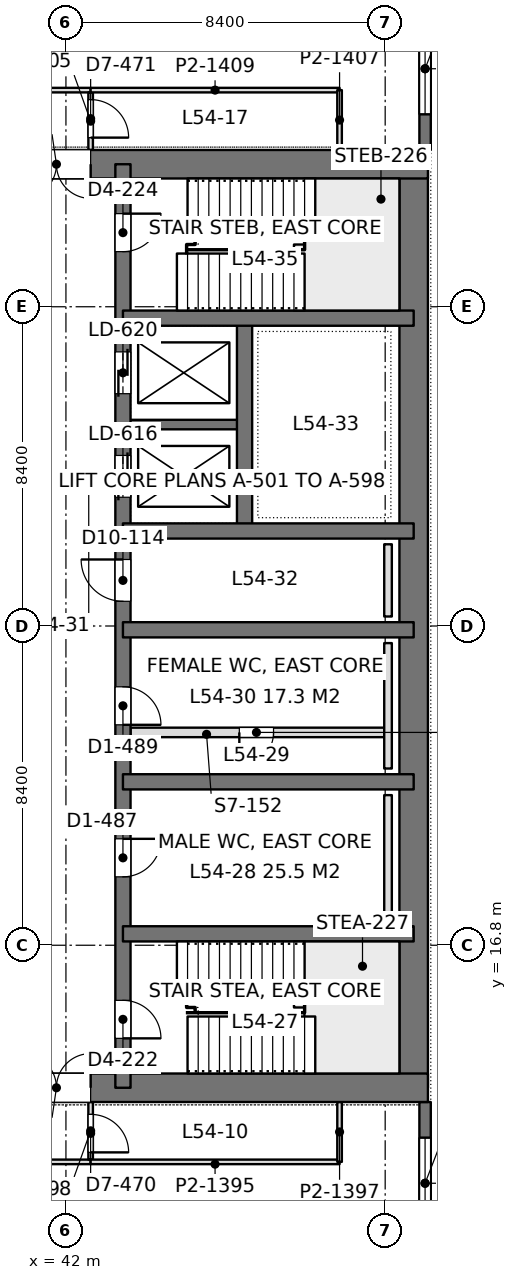
"""IFC4 building model, lengths in metres.
Left out: names, types, materials, properties, quantities, classifications, styles, units other than length and angle.
Written with IfcOpenShell. Run it as: python <this file> out.ifc"""

import sys

from ifc_helpers import new_model, si_unit, direction, frame, frame_2d, origin, place, context, subcontext, project, spatial, rectangle, extrude, element, fill, save


model = new_model("IFC4")
c1 = context("Model", 3, precision=1e-05, world=origin(), true_north=direction((0.0, 1.0)))
c2 = subcontext(c1, "Body", "Model", "MODEL_VIEW")
j1 = project(units=[si_unit("LENGTHUNIT", "METRE"), si_unit("PLANEANGLEUNIT", "RADIAN")], contexts=[c1])
p1 = place(None, origin())
s1 = spatial("IfcSite", under=j1, at=p1, CompositionType="ELEMENT")
p2 = place(p1, origin())
s2 = spatial("IfcBuilding", under=s1, at=p2, CompositionType="ELEMENT")
p3 = place(p2, frame((0.0, 0.0, 236.4)))
s3 = spatial("IfcBuildingStorey", under=s2, at=p3, CompositionType="ELEMENT", Elevation=236.4)
p4 = place(p3, frame((33.675, 13.05, 0.0), z_axis=(0.0, 0.0, 1.0), x_axis=(1.0, 0.0, 0.0)))
e1 = element("IfcWall", 1, at=p4, inside=s3, PredefinedType="SHEAR", context=c2, shape_type="SweptSolid", body=[
    extrude(rectangle(XDim=17.85, YDim=0.75, at=frame_2d((8.925, 0.0))), origin(), (0.0, 0.0, 1.0), 4.2),
])
p5 = place(p4, frame((7.175, 0.0, 0.0)))
e2 = element("IfcOpeningElement", 2, at=p5, cuts=e1, PredefinedType="OPENING", context=c2, shape_type="SweptSolid", body=[
    extrude(rectangle(XDim=1.8, YDim=2.4, at=frame_2d((0.9, 1.2))), frame((0.0, 0.385, 0.0), z_axis=(0.0, -1.0, 0.0), x_axis=(1.0, 0.0, 0.0)), (0.0, 0.0, 1.0), 0.77),
])
p6 = place(p3, frame((33.675, 37.35, 0.0), z_axis=(0.0, 0.0, 1.0), x_axis=(1.0, 0.0, 0.0)))
e3 = element("IfcWall", 3, at=p6, inside=s3, PredefinedType="SHEAR", context=c2, shape_type="SweptSolid", body=[
    extrude(rectangle(XDim=17.85, YDim=0.75, at=frame_2d((8.925, 0.0))), origin(), (0.0, 0.0, 1.0), 4.2),
])
p7 = place(p6, frame((7.175, 0.0, 0.0)))
e4 = element("IfcOpeningElement", 4, at=p7, cuts=e3, PredefinedType="OPENING", context=c2, shape_type="SweptSolid", body=[
    extrude(rectangle(XDim=1.8, YDim=2.4, at=frame_2d((0.9, 1.2))), frame((0.0, 0.385, 0.0), z_axis=(0.0, -1.0, 0.0), x_axis=(1.0, 0.0, 0.0)), (0.0, 0.0, 1.0), 0.77),
])
p8 = place(p3, frame((51.15, 13.05, 0.0), z_axis=(0.0, 0.0, 1.0), x_axis=(0.0, 1.0, 0.0)))
e5 = element("IfcWall", 5, at=p8, inside=s3, PredefinedType="SHEAR", context=c2, shape_type="SweptSolid", body=[
    extrude(rectangle(XDim=24.3, YDim=0.75, at=frame_2d((12.15, 0.0))), origin(), (0.0, 0.0, 1.0), 4.2),
])
p9 = place(p3, frame((43.5, 13.05, 0.0), z_axis=(0.0, 0.0, 1.0), x_axis=(0.0, 1.0, 0.0)))
e6 = element("IfcWall", 6, at=p9, inside=s3, PredefinedType="SHEAR", context=c2, shape_type="SweptSolid", body=[
    extrude(rectangle(XDim=24.3, YDim=0.4, at=frame_2d((12.15, 0.0))), origin(), (0.0, 0.0, 1.0), 4.2),
])
p10 = place(p9, frame((1.3, 0.0, 0.0)))
e7 = element("IfcOpeningElement", 7, at=p10, cuts=e6, PredefinedType="OPENING", context=c2, shape_type="SweptSolid", body=[
    extrude(rectangle(XDim=1.0, YDim=2.2, at=frame_2d((0.5, 1.1))), frame((0.0, 0.21, 0.0), z_axis=(0.0, -1.0, 0.0), x_axis=(1.0, 0.0, 0.0)), (0.0, 0.0, 1.0), 0.42),
])
p11 = place(p9, frame((22.0, 0.0, 0.0)))
e8 = element("IfcOpeningElement", 8, at=p11, cuts=e6, PredefinedType="OPENING", context=c2, shape_type="SweptSolid", body=[
    extrude(rectangle(XDim=1.0, YDim=2.2, at=frame_2d((0.5, 1.1))), frame((0.0, 0.21, 0.0), z_axis=(0.0, -1.0, 0.0), x_axis=(1.0, 0.0, 0.0)), (0.0, 0.0, 1.0), 0.42),
])
p12 = place(p9, frame((5.55, 0.0, 0.0)))
e9 = element("IfcOpeningElement", 9, at=p12, cuts=e6, PredefinedType="OPENING", context=c2, shape_type="SweptSolid", body=[
    extrude(rectangle(XDim=1.0, YDim=2.2, at=frame_2d((0.5, 1.1))), frame((0.0, 0.21, 0.0), z_axis=(0.0, -1.0, 0.0), x_axis=(1.0, 0.0, 0.0)), (0.0, 0.0, 1.0), 0.42),
])
p13 = place(p9, frame((9.55, 0.0, 0.0)))
e10 = element("IfcOpeningElement", 10, at=p13, cuts=e6, PredefinedType="OPENING", context=c2, shape_type="SweptSolid", body=[
    extrude(rectangle(XDim=1.0, YDim=2.2, at=frame_2d((0.5, 1.1))), frame((0.0, 0.21, 0.0), z_axis=(0.0, -1.0, 0.0), x_axis=(1.0, 0.0, 0.0)), (0.0, 0.0, 1.0), 0.42),
])
p14 = place(p9, frame((12.8, 0.0, 0.0)))
e11 = element("IfcOpeningElement", 11, at=p14, cuts=e6, PredefinedType="OPENING", context=c2, shape_type="SweptSolid", body=[
    extrude(rectangle(XDim=1.1, YDim=2.2, at=frame_2d((0.55, 1.1))), frame((0.0, 0.21, 0.0), z_axis=(0.0, -1.0, 0.0), x_axis=(1.0, 0.0, 0.0)), (0.0, 0.0, 1.0), 0.42),
])
p15 = place(p9, frame((15.538, 0.0, 0.0)))
e12 = element("IfcOpeningElement", 12, at=p15, cuts=e6, PredefinedType="OPENING", context=c2, shape_type="SweptSolid", body=[
    extrude(rectangle(XDim=1.1, YDim=2.2, at=frame_2d((0.55, 1.1))), frame((0.0, 0.21, 0.0), z_axis=(0.0, -1.0, 0.0), x_axis=(1.0, 0.0, 0.0)), (0.0, 0.0, 1.0), 0.42),
])
p16 = place(p9, frame((18.262, 0.0, 0.0)))
e13 = element("IfcOpeningElement", 13, at=p16, cuts=e6, PredefinedType="OPENING", context=c2, shape_type="SweptSolid", body=[
    extrude(rectangle(XDim=1.1, YDim=2.2, at=frame_2d((0.55, 1.1))), frame((0.0, 0.21, 0.0), z_axis=(0.0, -1.0, 0.0), x_axis=(1.0, 0.0, 0.0)), (0.0, 0.0, 1.0), 0.42),
])
for number, where, z_axis, x_axis in (
    (14, (51.15, 17.1, 0.0), (0.0, 0.0, 1.0), (-1.0, 0.0, 0.0)),
    (15, (51.15, 21.1, 0.0), (0.0, 0.0, 1.0), (-1.0, 0.0, 0.0)),
    (16, (51.15, 25.1, 0.0), (0.0, 0.0, 1.0), (-1.0, 0.0, 0.0)),
    (17, (51.15, 27.7, 0.0), (0.0, 0.0, 1.0), (-1.0, 0.0, 0.0)),
    (18, (51.15, 33.3, 0.0), (0.0, 0.0, 1.0), (-1.0, 0.0, 0.0)),
):
    element("IfcWall", number, at=place(p3, frame(where, z_axis=z_axis, x_axis=x_axis)), inside=s3, PredefinedType="SHEAR", context=c2, shape_type="SweptSolid", body=[
        extrude(rectangle(XDim=7.65, YDim=0.4, at=frame_2d((3.825, 0.0))), origin(), (0.0, 0.0, 1.0), 4.2),
    ])
p17 = place(p3, frame((46.7, 27.7, 0.0), z_axis=(0.0, 0.0, 1.0), x_axis=(0.0, 1.0, 0.0)))
e19 = element("IfcWall", 19, at=p17, inside=s3, PredefinedType="SHEAR", context=c2, shape_type="SweptSolid", body=[
    extrude(rectangle(XDim=5.6, YDim=0.4, at=frame_2d((2.8, 0.0))), origin(), (0.0, 0.0, 1.0), 4.2),
])
p18 = place(p3, frame((46.7, 30.5, 0.0), z_axis=(0.0, 0.0, 1.0), x_axis=(-1.0, 0.0, 0.0)))
e20 = element("IfcWall", 20, at=p18, inside=s3, PredefinedType="SHEAR", context=c2, shape_type="SweptSolid", body=[
    extrude(rectangle(XDim=3.2, YDim=0.25, at=frame_2d((1.6, 0.0))), origin(), (0.0, 0.0, 1.0), 4.2),
])
p19 = place(p3, frame((51.45, 42.0, 0.0), z_axis=(0.0, 0.0, 1.0), x_axis=(0.0, -1.0, 0.0)))
e21 = element("IfcWall", 21, at=p19, inside=s3, PredefinedType="SOLIDWALL", context=c2, shape_type="SweptSolid", body=[
    extrude(rectangle(XDim=4.275, YDim=0.3, at=frame_2d((2.137, 0.0))), origin(), (0.0, 0.0, 1.0), 4.05),
])
p20 = place(p19, frame((0.938, 0.0, 0.9)))
e22 = element("IfcOpeningElement", 22, at=p20, cuts=e21, PredefinedType="OPENING", context=c2, shape_type="SweptSolid", body=[
    extrude(rectangle(XDim=2.4, YDim=1.9, at=frame_2d((1.2, 0.95))), frame((0.0, 0.16, 0.0), z_axis=(0.0, -1.0, 0.0), x_axis=(1.0, 0.0, 0.0)), (0.0, 0.0, 1.0), 0.32),
])
p21 = place(p3, frame((51.45, 12.675, 0.0), z_axis=(0.0, 0.0, 1.0), x_axis=(0.0, -1.0, 0.0)))
e23 = element("IfcWall", 23, at=p21, inside=s3, PredefinedType="SOLIDWALL", context=c2, shape_type="SweptSolid", body=[
    extrude(rectangle(XDim=4.275, YDim=0.3, at=frame_2d((2.138, 0.0))), origin(), (0.0, 0.0, 1.0), 4.05),
])
p22 = place(p21, frame((0.938, 0.0, 0.9)))
e24 = element("IfcOpeningElement", 24, at=p22, cuts=e23, PredefinedType="OPENING", context=c2, shape_type="SweptSolid", body=[
    extrude(rectangle(XDim=2.4, YDim=1.9, at=frame_2d((1.2, 0.95))), frame((0.0, 0.16, 0.0), z_axis=(0.0, -1.0, 0.0), x_axis=(1.0, 0.0, 0.0)), (0.0, 0.0, 1.0), 0.32),
])
p23 = place(p3, frame((1.2, 11.1, 0.0), z_axis=(0.0, 0.0, 1.0), x_axis=(1.0, 0.0, 0.0)))
e25 = element("IfcWall", 25, at=p23, inside=s3, PredefinedType="PARTITIONING", context=c2, shape_type="SweptSolid", body=[
    extrude(rectangle(XDim=41.452, YDim=0.12, at=frame_2d((20.726, 0.0))), origin(), (0.0, 0.0, 1.0), 3.55),
])
p24 = place(p23, frame((4.3, 0.0, 0.0)))
e26 = element("IfcOpeningElement", 26, at=p24, cuts=e25, PredefinedType="OPENING", context=c2, shape_type="SweptSolid", body=[
    extrude(rectangle(XDim=1.8, YDim=2.2, at=frame_2d((0.9, 1.1))), frame((0.0, 0.07, 0.0), z_axis=(0.0, -1.0, 0.0), x_axis=(1.0, 0.0, 0.0)), (0.0, 0.0, 1.0), 0.14),
])
p25 = place(p23, frame((9.5, 0.0, 0.0)))
e27 = element("IfcOpeningElement", 27, at=p25, cuts=e25, PredefinedType="OPENING", context=c2, shape_type="SweptSolid", body=[
    extrude(rectangle(XDim=1.8, YDim=2.2, at=frame_2d((0.9, 1.1))), frame((0.0, 0.07, 0.0), z_axis=(0.0, -1.0, 0.0), x_axis=(1.0, 0.0, 0.0)), (0.0, 0.0, 1.0), 0.14),
])
p26 = place(p23, frame((23.317, 0.0, 0.0)))
e28 = element("IfcOpeningElement", 28, at=p26, cuts=e25, PredefinedType="OPENING", context=c2, shape_type="SweptSolid", body=[
    extrude(rectangle(XDim=1.8, YDim=2.2, at=frame_2d((0.9, 1.1))), frame((0.0, 0.07, 0.0), z_axis=(0.0, -1.0, 0.0), x_axis=(1.0, 0.0, 0.0)), (0.0, 0.0, 1.0), 0.14),
])
p27 = place(p23, frame((31.933, 0.0, 0.0)))
e29 = element("IfcOpeningElement", 29, at=p27, cuts=e25, PredefinedType="OPENING", context=c2, shape_type="SweptSolid", body=[
    extrude(rectangle(XDim=1.8, YDim=2.2, at=frame_2d((0.9, 1.1))), frame((0.0, 0.07, 0.0), z_axis=(0.0, -1.0, 0.0), x_axis=(1.0, 0.0, 0.0)), (0.0, 0.0, 1.0), 0.14),
])
p28 = place(p3, frame((42.65, 11.158, 0.0), z_axis=(0.0, 0.0, 1.0), x_axis=(0.0, 1.0, 0.0)))
e30 = element("IfcWall", 30, at=p28, inside=s3, PredefinedType="PARTITIONING", context=c2, shape_type="SweptSolid", body=[
    extrude(rectangle(XDim=1.518, YDim=0.12, at=frame_2d((0.759, 0.0))), origin(), (0.0, 0.0, 1.0), 4.05),
])
p29 = place(p28, frame((0.192, 0.0, 0.0)))
e31 = element("IfcOpeningElement", 31, at=p29, cuts=e30, PredefinedType="OPENING", context=c2, shape_type="SweptSolid", body=[
    extrude(rectangle(XDim=1.0, YDim=2.4, at=frame_2d((0.5, 1.2))), frame((0.0, 0.07, 0.0), z_axis=(0.0, -1.0, 0.0), x_axis=(1.0, 0.0, 0.0)), (0.0, 0.0, 1.0), 0.14),
])
p30 = place(p3, frame((42.648, 11.1, 0.0), z_axis=(0.0, 0.0, 1.0), x_axis=(1.0, 0.0, 0.0)))
e32 = element("IfcWall", 32, at=p30, inside=s3, PredefinedType="PARTITIONING", context=c2, shape_type="SweptSolid", body=[
    extrude(rectangle(XDim=6.552, YDim=0.12, at=frame_2d((3.276, 0.0))), origin(), (0.0, 0.0, 1.0), 4.05),
])
p31 = place(p3, frame((49.2, 11.1, 0.0), z_axis=(0.0, 0.0, 1.0), x_axis=(0.0, 1.0, 0.0)))
e33 = element("IfcWall", 33, at=p31, inside=s3, PredefinedType="PARTITIONING", context=c2, shape_type="SweptSolid", body=[
    extrude(rectangle(XDim=1.576, YDim=0.12, at=frame_2d((0.788, 0.0))), origin(), (0.0, 0.0, 1.0), 4.05),
])
p32 = place(p3, frame((1.2, 39.3, 0.0), z_axis=(0.0, 0.0, 1.0), x_axis=(1.0, 0.0, 0.0)))
e34 = element("IfcWall", 34, at=p32, inside=s3, PredefinedType="PARTITIONING", context=c2, shape_type="SweptSolid", body=[
    extrude(rectangle(XDim=41.452, YDim=0.12, at=frame_2d((20.726, 0.0))), origin(), (0.0, 0.0, 1.0), 3.55),
])
p33 = place(p32, frame((4.3, 0.0, 0.0)))
e35 = element("IfcOpeningElement", 35, at=p33, cuts=e34, PredefinedType="OPENING", context=c2, shape_type="SweptSolid", body=[
    extrude(rectangle(XDim=1.8, YDim=2.2, at=frame_2d((0.9, 1.1))), frame((0.0, 0.07, 0.0), z_axis=(0.0, -1.0, 0.0), x_axis=(1.0, 0.0, 0.0)), (0.0, 0.0, 1.0), 0.14),
])
p34 = place(p32, frame((9.5, 0.0, 0.0)))
e36 = element("IfcOpeningElement", 36, at=p34, cuts=e34, PredefinedType="OPENING", context=c2, shape_type="SweptSolid", body=[
    extrude(rectangle(XDim=1.8, YDim=2.2, at=frame_2d((0.9, 1.1))), frame((0.0, 0.07, 0.0), z_axis=(0.0, -1.0, 0.0), x_axis=(1.0, 0.0, 0.0)), (0.0, 0.0, 1.0), 0.14),
])
p35 = place(p32, frame((23.317, 0.0, 0.0)))
e37 = element("IfcOpeningElement", 37, at=p35, cuts=e34, PredefinedType="OPENING", context=c2, shape_type="SweptSolid", body=[
    extrude(rectangle(XDim=1.8, YDim=2.2, at=frame_2d((0.9, 1.1))), frame((0.0, 0.07, 0.0), z_axis=(0.0, -1.0, 0.0), x_axis=(1.0, 0.0, 0.0)), (0.0, 0.0, 1.0), 0.14),
])
p36 = place(p32, frame((31.933, 0.0, 0.0)))
e38 = element("IfcOpeningElement", 38, at=p36, cuts=e34, PredefinedType="OPENING", context=c2, shape_type="SweptSolid", body=[
    extrude(rectangle(XDim=1.8, YDim=2.2, at=frame_2d((0.9, 1.1))), frame((0.0, 0.07, 0.0), z_axis=(0.0, -1.0, 0.0), x_axis=(1.0, 0.0, 0.0)), (0.0, 0.0, 1.0), 0.14),
])
p37 = place(p3, frame((42.65, 37.724, 0.0), z_axis=(0.0, 0.0, 1.0), x_axis=(0.0, 1.0, 0.0)))
e39 = element("IfcWall", 39, at=p37, inside=s3, PredefinedType="PARTITIONING", context=c2, shape_type="SweptSolid", body=[
    extrude(rectangle(XDim=1.518, YDim=0.12, at=frame_2d((0.759, 0.0))), origin(), (0.0, 0.0, 1.0), 4.05),
])
p38 = place(p37, frame((0.326, 0.0, 0.0)))
e40 = element("IfcOpeningElement", 40, at=p38, cuts=e39, PredefinedType="OPENING", context=c2, shape_type="SweptSolid", body=[
    extrude(rectangle(XDim=1.0, YDim=2.4, at=frame_2d((0.5, 1.2))), frame((0.0, 0.07, 0.0), z_axis=(0.0, -1.0, 0.0), x_axis=(1.0, 0.0, 0.0)), (0.0, 0.0, 1.0), 0.14),
])
p39 = place(p3, frame((42.648, 39.3, 0.0), z_axis=(0.0, 0.0, 1.0), x_axis=(1.0, 0.0, 0.0)))
e41 = element("IfcWall", 41, at=p39, inside=s3, PredefinedType="PARTITIONING", context=c2, shape_type="SweptSolid", body=[
    extrude(rectangle(XDim=6.552, YDim=0.12, at=frame_2d((3.276, 0.0))), origin(), (0.0, 0.0, 1.0), 3.69),
])
p40 = place(p3, frame((49.2, 37.724, 0.0), z_axis=(0.0, 0.0, 1.0), x_axis=(0.0, 1.0, 0.0)))
e42 = element("IfcWall", 42, at=p40, inside=s3, PredefinedType="PARTITIONING", context=c2, shape_type="SweptSolid", body=[
    extrude(rectangle(XDim=1.576, YDim=0.12, at=frame_2d((0.788, 0.0))), origin(), (0.0, 0.0, 1.0), 4.05),
])
p41 = place(p3, frame((43.7, 22.4, 0.0), z_axis=(0.0, 0.0, 1.0), x_axis=(1.0, 0.0, 0.0)))
e43 = element("IfcWall", 43, at=p41, inside=s3, PredefinedType="PARTITIONING", context=c2, shape_type="SweptSolid", body=[
    extrude(rectangle(XDim=6.675, YDim=0.25, at=frame_2d((3.337, 0.0))), origin(), (0.0, 0.0, 1.0), 4.0),
])
p42 = place(p41, frame((2.863, 0.0, 0.0)))
e44 = element("IfcOpeningElement", 44, at=p42, cuts=e43, PredefinedType="OPENING", context=c2, shape_type="SweptSolid", body=[
    extrude(rectangle(XDim=0.9, YDim=2.2, at=frame_2d((0.45, 1.1))), frame((0.0, 0.135, 0.0), z_axis=(0.0, -1.0, 0.0), x_axis=(1.0, 0.0, 0.0)), (0.0, 0.0, 1.0), 0.27),
])
for number, where, z_axis, x_axis in (
    (45, (50.475, 17.45, 0.0), (0.0, 0.0, 1.0), (0.0, 1.0, 0.0)),
    (46, (50.475, 21.45, 0.0), (0.0, 0.0, 1.0), (0.0, 1.0, 0.0)),
):
    element("IfcWall", number, at=place(p3, frame(where, z_axis=z_axis, x_axis=x_axis)), inside=s3, PredefinedType="PLUMBINGWALL", context=c2, shape_type="SweptSolid", body=[
        extrude(rectangle(XDim=3.3, YDim=0.2, at=frame_2d((1.65, 0.0))), origin(), (0.0, 0.0, 1.0), 1.2),
    ])
p43 = place(p3, frame((50.475, 25.45, 0.0), z_axis=(0.0, 0.0, 1.0), x_axis=(0.0, 1.0, 0.0)))
e47 = element("IfcWall", 47, at=p43, inside=s3, PredefinedType="PLUMBINGWALL", context=c2, shape_type="SweptSolid", body=[
    extrude(rectangle(XDim=1.9, YDim=0.2, at=frame_2d((0.95, 0.0))), origin(), (0.0, 0.0, 1.0), 1.2),
])
p44 = place(p20, origin())
e48 = element("IfcWindow", 48, at=p44, inside=s3, PartitioningType="SINGLE_PANEL", PredefinedType="WINDOW", context=c2, shape_type="SweptSolid", body=[
    extrude(rectangle(XDim=2.4, YDim=1.9, at=frame_2d((1.2, 0.95))), frame((0.0, 0.03, 0.0), z_axis=(0.0, -1.0, 0.0), x_axis=(1.0, 0.0, 0.0)), (0.0, 0.0, 1.0), 0.06),
])
fill(e22, e48)
p45 = place(p22, origin())
e49 = element("IfcWindow", 49, at=p45, inside=s3, PartitioningType="SINGLE_PANEL", PredefinedType="WINDOW", context=c2, shape_type="SweptSolid", body=[
    extrude(rectangle(XDim=2.4, YDim=1.9, at=frame_2d((1.2, 0.95))), frame((0.0, 0.03, 0.0), z_axis=(0.0, -1.0, 0.0), x_axis=(1.0, 0.0, 0.0)), (0.0, 0.0, 1.0), 0.06),
])
fill(e24, e49)
p46 = place(p5, origin())
e50 = element("IfcDoor", 50, at=p46, inside=s3, OperationType="DOUBLE_DOOR_SINGLE_SWING", PredefinedType="DOOR", context=c2, shape_type="SweptSolid", body=[
    extrude(rectangle(XDim=1.8, YDim=2.4, at=frame_2d((0.9, 1.2))), frame((0.0, 0.025, 0.0), z_axis=(0.0, -1.0, 0.0), x_axis=(1.0, 0.0, 0.0)), (0.0, 0.0, 1.0), 0.05),
])
fill(e2, e50)
p47 = place(p7, frame((1.8, 0.0, 0.0), z_axis=(0.0, 0.0, 1.0), x_axis=(-1.0, 0.0, 0.0)))
e51 = element("IfcDoor", 51, at=p47, inside=s3, OperationType="DOUBLE_DOOR_SINGLE_SWING", PredefinedType="DOOR", context=c2, shape_type="SweptSolid", body=[
    extrude(rectangle(XDim=1.8, YDim=2.4, at=frame_2d((0.9, 1.2))), frame((0.0, 0.025, 0.0), z_axis=(0.0, -1.0, 0.0), x_axis=(1.0, 0.0, 0.0)), (0.0, 0.0, 1.0), 0.05),
])
fill(e4, e51)
p48 = place(p10, frame((1.0, 0.0, 0.0), z_axis=(0.0, 0.0, 1.0), x_axis=(-1.0, 0.0, 0.0)))
e52 = element("IfcDoor", 52, at=p48, inside=s3, OperationType="SINGLE_SWING_RIGHT", PredefinedType="DOOR", context=c2, shape_type="SweptSolid", body=[
    extrude(rectangle(XDim=1.0, YDim=2.2, at=frame_2d((0.5, 1.1))), frame((0.0, 0.025, 0.0), z_axis=(0.0, -1.0, 0.0), x_axis=(1.0, 0.0, 0.0)), (0.0, 0.0, 1.0), 0.05),
])
fill(e7, e52)
p49 = place(p11, frame((1.0, 0.0, 0.0), z_axis=(0.0, 0.0, 1.0), x_axis=(-1.0, 0.0, 0.0)))
e53 = element("IfcDoor", 53, at=p49, inside=s3, OperationType="SINGLE_SWING_LEFT", PredefinedType="DOOR", context=c2, shape_type="SweptSolid", body=[
    extrude(rectangle(XDim=1.0, YDim=2.2, at=frame_2d((0.5, 1.1))), frame((0.0, 0.025, 0.0), z_axis=(0.0, -1.0, 0.0), x_axis=(1.0, 0.0, 0.0)), (0.0, 0.0, 1.0), 0.05),
])
fill(e8, e53)
p50 = place(p12, frame((1.0, 0.0, 0.0), z_axis=(0.0, 0.0, 1.0), x_axis=(-1.0, 0.0, 0.0)))
e54 = element("IfcDoor", 54, at=p50, inside=s3, OperationType="SINGLE_SWING_LEFT", PredefinedType="DOOR", context=c2, shape_type="SweptSolid", body=[
    extrude(rectangle(XDim=1.0, YDim=2.2, at=frame_2d((0.5, 1.1))), frame((0.0, 0.025, 0.0), z_axis=(0.0, -1.0, 0.0), x_axis=(1.0, 0.0, 0.0)), (0.0, 0.0, 1.0), 0.05),
])
fill(e9, e54)
p51 = place(p13, frame((1.0, 0.0, 0.0), z_axis=(0.0, 0.0, 1.0), x_axis=(-1.0, 0.0, 0.0)))
e55 = element("IfcDoor", 55, at=p51, inside=s3, OperationType="SINGLE_SWING_RIGHT", PredefinedType="DOOR", context=c2, shape_type="SweptSolid", body=[
    extrude(rectangle(XDim=1.0, YDim=2.2, at=frame_2d((0.5, 1.1))), frame((0.0, 0.025, 0.0), z_axis=(0.0, -1.0, 0.0), x_axis=(1.0, 0.0, 0.0)), (0.0, 0.0, 1.0), 0.05),
])
fill(e10, e55)
p52 = place(p14, origin())
e56 = element("IfcDoor", 56, at=p52, inside=s3, OperationType="SINGLE_SWING_RIGHT", PredefinedType="DOOR", context=c2, shape_type="SweptSolid", body=[
    extrude(rectangle(XDim=1.1, YDim=2.2, at=frame_2d((0.55, 1.1))), frame((0.0, 0.025, 0.0), z_axis=(0.0, -1.0, 0.0), x_axis=(1.0, 0.0, 0.0)), (0.0, 0.0, 1.0), 0.05),
])
fill(e11, e56)
p53 = place(p15, origin())
e57 = element("IfcDoor", 57, at=p53, inside=s3, OperationType="DOUBLE_DOOR_SLIDING", PredefinedType="DOOR", context=c2, shape_type="SweptSolid", body=[
    extrude(rectangle(XDim=1.1, YDim=2.2, at=frame_2d((0.55, 1.1))), frame((0.0, 0.025, 0.0), z_axis=(0.0, -1.0, 0.0), x_axis=(1.0, 0.0, 0.0)), (0.0, 0.0, 1.0), 0.05),
])
fill(e12, e57)
p54 = place(p16, origin())
e58 = element("IfcDoor", 58, at=p54, inside=s3, OperationType="DOUBLE_DOOR_SLIDING", PredefinedType="DOOR", context=c2, shape_type="SweptSolid", body=[
    extrude(rectangle(XDim=1.1, YDim=2.2, at=frame_2d((0.55, 1.1))), frame((0.0, 0.025, 0.0), z_axis=(0.0, -1.0, 0.0), x_axis=(1.0, 0.0, 0.0)), (0.0, 0.0, 1.0), 0.05),
])
fill(e13, e58)
p55 = place(p29, frame((1.0, 0.0, 0.0), z_axis=(0.0, 0.0, 1.0), x_axis=(-1.0, 0.0, 0.0)))
e59 = element("IfcDoor", 59, at=p55, inside=s3, OperationType="SINGLE_SWING_RIGHT", PredefinedType="DOOR", context=c2, shape_type="SweptSolid", body=[
    extrude(rectangle(XDim=1.0, YDim=2.4, at=frame_2d((0.5, 1.2))), frame((0.0, 0.025, 0.0), z_axis=(0.0, -1.0, 0.0), x_axis=(1.0, 0.0, 0.0)), (0.0, 0.0, 1.0), 0.05),
])
fill(e31, e59)
p56 = place(p38, frame((1.0, 0.0, 0.0), z_axis=(0.0, 0.0, 1.0), x_axis=(-1.0, 0.0, 0.0)))
e60 = element("IfcDoor", 60, at=p56, inside=s3, OperationType="SINGLE_SWING_RIGHT", PredefinedType="DOOR", context=c2, shape_type="SweptSolid", body=[
    extrude(rectangle(XDim=1.0, YDim=2.4, at=frame_2d((0.5, 1.2))), frame((0.0, 0.025, 0.0), z_axis=(0.0, -1.0, 0.0), x_axis=(1.0, 0.0, 0.0)), (0.0, 0.0, 1.0), 0.05),
])
fill(e40, e60)
p57 = place(p42, frame((0.9, 0.0, 0.0), z_axis=(0.0, 0.0, 1.0), x_axis=(-1.0, 0.0, 0.0)))
e61 = element("IfcDoor", 61, at=p57, inside=s3, OperationType="SINGLE_SWING_RIGHT", PredefinedType="DOOR", context=c2, shape_type="SweptSolid", body=[
    extrude(rectangle(XDim=0.9, YDim=2.2, at=frame_2d((0.45, 1.1))), frame((0.0, 0.025, 0.0), z_axis=(0.0, -1.0, 0.0), x_axis=(1.0, 0.0, 0.0)), (0.0, 0.0, 1.0), 0.05),
])
fill(e44, e61)
save(model, sys.argv[1])
